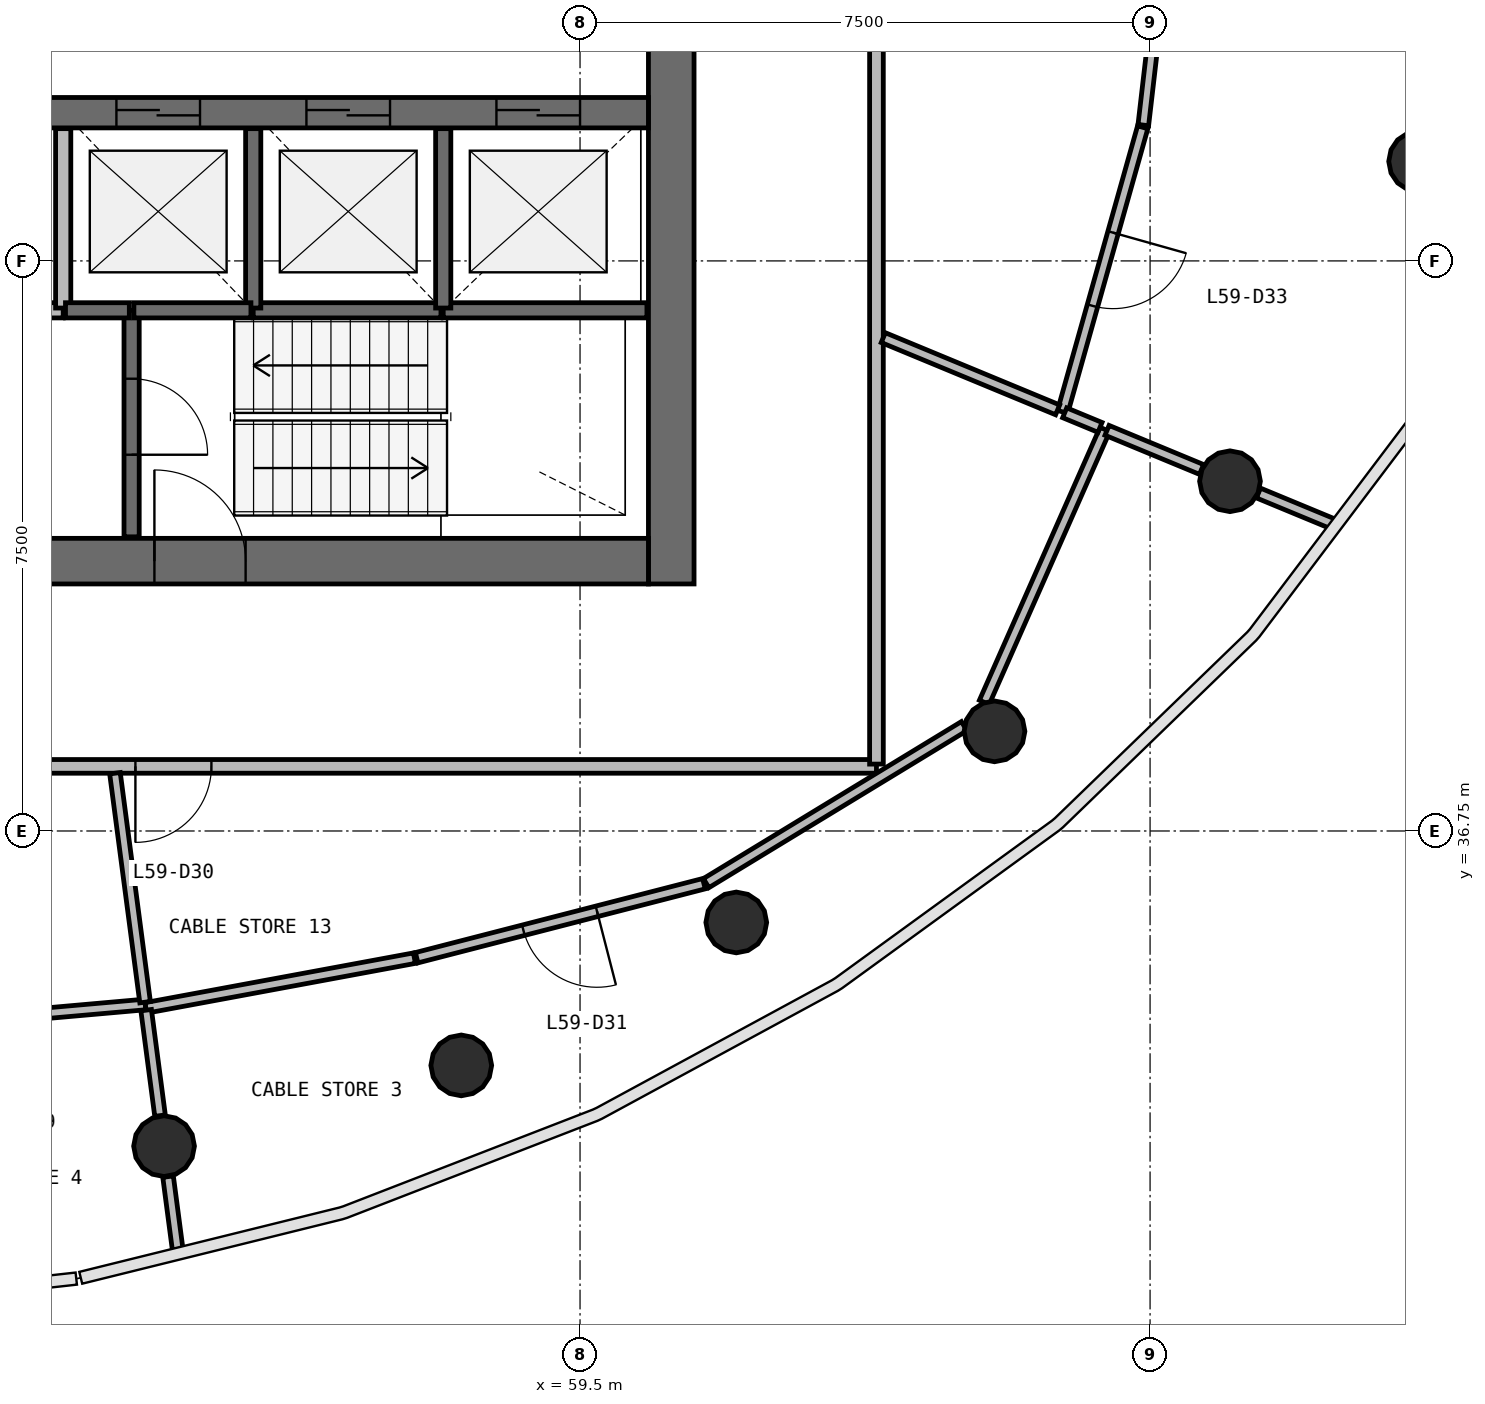
"""IFC4 building model, lengths in metres.
Left out: names, types, materials, properties, quantities, classifications, styles, units other than length and angle.
Written with IfcOpenShell. Run it as: python <this file> out.ifc"""

import sys

from ifc_helpers import new_model, si_unit, direction, frame, frame_2d, origin, origin_2d, place, context, subcontext, project, spatial, rectangle, circle, extrude, source, transform, mapped, element, fill, save


model = new_model("IFC4")
c1 = context("Model", 3, precision=1e-05, world=origin(), true_north=direction((0.0, 1.0)))
c2 = subcontext(c1, "Body", "Model", "MODEL_VIEW")
j1 = project(units=[si_unit("LENGTHUNIT", "METRE"), si_unit("PLANEANGLEUNIT", "RADIAN")], contexts=[c1])
p1 = place(None, origin())
s1 = spatial("IfcSite", under=j1, at=p1, CompositionType="ELEMENT")
p2 = place(p1, origin())
s2 = spatial("IfcBuilding", under=s1, at=p2, CompositionType="ELEMENT")
p3 = place(p2, frame((0.0, 0.0, 242.3)))
s3 = spatial("IfcBuildingStorey", under=s2, at=p3, CompositionType="ELEMENT", Elevation=242.3)
p4 = place(p3, frame((60.7, 40.0, 0.0), z_axis=(0.0, 0.0, 1.0), x_axis=(0.0, 1.0, 0.0)))
e1 = element("IfcWall", 1, at=p4, inside=s3, PredefinedType="SHEAR", context=c2, shape_type="SweptSolid", body=[
    extrude(rectangle(XDim=16.0, YDim=0.6, at=frame_2d((8.0, 0.0))), origin(), (0.0, 0.0, 1.0), 3.9),
])
p5 = place(p4, frame((7.1, 0.0, 0.0)))
e2 = element("IfcOpeningElement", 2, at=p5, cuts=e1, PredefinedType="OPENING", context=c2, shape_type="SweptSolid", body=[
    extrude(rectangle(XDim=1.8, YDim=2.1, at=frame_2d((0.9, 1.05))), frame((0.0, 0.31, 0.0), z_axis=(0.0, -1.0, 0.0), x_axis=(1.0, 0.0, 0.0)), (0.0, 0.0, 1.0), 0.62),
])
p6 = place(p3, frame((43.6, 40.3, 0.0), z_axis=(0.0, 0.0, 1.0), x_axis=(1.0, 0.0, 0.0)))
e3 = element("IfcWall", 3, at=p6, inside=s3, PredefinedType="SHEAR", context=c2, shape_type="SweptSolid", body=[
    extrude(rectangle(XDim=16.8, YDim=0.6, at=frame_2d((8.4, 0.0))), origin(), (0.0, 0.0, 1.0), 3.9),
])
p7 = place(p6, frame((10.3, 0.0, 0.0)))
e4 = element("IfcOpeningElement", 4, at=p7, cuts=e3, PredefinedType="OPENING", context=c2, shape_type="SweptSolid", body=[
    extrude(rectangle(XDim=1.2, YDim=2.1, at=frame_2d((0.6, 1.05))), frame((0.0, 0.31, 0.0), z_axis=(0.0, -1.0, 0.0), x_axis=(1.0, 0.0, 0.0)), (0.0, 0.0, 1.0), 0.62),
])
p8 = place(p6, frame((7.25, 0.0, 0.0)))
e5 = element("IfcOpeningElement", 5, at=p8, cuts=e3, PredefinedType="OPENING", context=c2, shape_type="SweptSolid", body=[
    extrude(rectangle(XDim=1.1, YDim=2.1, at=frame_2d((0.55, 1.05))), frame((0.0, 0.31, 0.0), z_axis=(0.0, -1.0, 0.0), x_axis=(1.0, 0.0, 0.0)), (0.0, 0.0, 1.0), 0.62),
])
p9 = place(p6, frame((0.7, 0.0, 0.0)))
e6 = element("IfcOpeningElement", 6, at=p9, cuts=e3, PredefinedType="OPENING", context=c2, shape_type="SweptSolid", body=[
    extrude(rectangle(XDim=0.8, YDim=2.1, at=frame_2d((0.4, 1.05))), frame((0.0, 0.31, 0.0), z_axis=(0.0, -1.0, 0.0), x_axis=(1.0, 0.0, 0.0)), (0.0, 0.0, 1.0), 0.62),
])
p10 = place(p3, frame((43.6, 46.2, 0.0), z_axis=(0.0, 0.0, 1.0), x_axis=(1.0, 0.0, 0.0)))
e7 = element("IfcWall", 7, at=p10, inside=s3, PredefinedType="SHEAR", context=c2, shape_type="SweptSolid", body=[
    extrude(rectangle(XDim=16.8, YDim=0.4, at=frame_2d((8.4, 0.0))), origin(), (0.0, 0.0, 1.0), 3.9),
])
p11 = place(p10, frame((9.8, 0.0, 0.0)))
e8 = element("IfcOpeningElement", 8, at=p11, cuts=e7, PredefinedType="OPENING", context=c2, shape_type="SweptSolid", body=[
    extrude(rectangle(XDim=1.1, YDim=2.1, at=frame_2d((0.55, 1.05))), frame((0.0, 0.21, 0.0), z_axis=(0.0, -1.0, 0.0), x_axis=(1.0, 0.0, 0.0)), (0.0, 0.0, 1.0), 0.42),
])
p12 = place(p10, frame((12.3, 0.0, 0.0)))
e9 = element("IfcOpeningElement", 9, at=p12, cuts=e7, PredefinedType="OPENING", context=c2, shape_type="SweptSolid", body=[
    extrude(rectangle(XDim=1.1, YDim=2.1, at=frame_2d((0.55, 1.05))), frame((0.0, 0.21, 0.0), z_axis=(0.0, -1.0, 0.0), x_axis=(1.0, 0.0, 0.0)), (0.0, 0.0, 1.0), 0.42),
])
p13 = place(p10, frame((14.8, 0.0, 0.0)))
e10 = element("IfcOpeningElement", 10, at=p13, cuts=e7, PredefinedType="OPENING", context=c2, shape_type="SweptSolid", body=[
    extrude(rectangle(XDim=1.1, YDim=2.1, at=frame_2d((0.55, 1.05))), frame((0.0, 0.21, 0.0), z_axis=(0.0, -1.0, 0.0), x_axis=(1.0, 0.0, 0.0)), (0.0, 0.0, 1.0), 0.42),
])
p14 = place(p10, frame((3.45, 0.0, 0.0)))
e11 = element("IfcOpeningElement", 11, at=p14, cuts=e7, PredefinedType="OPENING", context=c2, shape_type="SweptSolid", body=[
    extrude(rectangle(XDim=0.9, YDim=2.1, at=frame_2d((0.45, 1.05))), frame((0.0, 0.21, 0.0), z_axis=(0.0, -1.0, 0.0), x_axis=(1.0, 0.0, 0.0)), (0.0, 0.0, 1.0), 0.42),
])
p15 = place(p10, frame((7.85, 0.0, 0.0)))
e12 = element("IfcOpeningElement", 12, at=p15, cuts=e7, PredefinedType="OPENING", context=c2, shape_type="SweptSolid", body=[
    extrude(rectangle(XDim=0.9, YDim=2.1, at=frame_2d((0.45, 1.05))), frame((0.0, 0.21, 0.0), z_axis=(0.0, -1.0, 0.0), x_axis=(1.0, 0.0, 0.0)), (0.0, 0.0, 1.0), 0.42),
])
m1 = source(origin(), c2, "Body", "SweptSolid", [
    extrude(circle(Radius=0.4, at=origin_2d()), origin(), (0.0, 0.0, 1.0), 3.9),
])
for number, where, z_axis, x_axis in (
    (13, (54.027, 32.604, 0.0), (0.0, 0.0, 1.0), (1.0, 0.0, 0.0)),
    (14, (57.937, 33.666, 0.0), (0.0, 0.0, 1.0), (1.0, 0.0, 0.0)),
    (15, (61.556, 35.547, 0.0), (0.0, 0.0, 1.0), (1.0, 0.0, 0.0)),
    (16, (64.953, 38.061, 0.0), (0.0, 0.0, 1.0), (1.0, 0.0, 0.0)),
    (17, (68.052, 41.351, 0.0), (0.0, 0.0, 1.0), (1.0, 0.0, 0.0)),
    (18, (70.54, 45.559, 0.0), (0.0, 0.0, 1.0), (1.0, 0.0, 0.0)),
):
    element("IfcColumn", number, at=place(p3, frame(where, z_axis=z_axis, x_axis=x_axis)), inside=s3, PredefinedType="COLUMN", context=c2, shape_type="MappedRepresentation", body=[
        mapped(m1, transform((0.0, 0.0, 0.0), scale=1.0)),
    ])
p16 = place(p3, frame((52.7, 43.6, 0.0), z_axis=(0.0, 0.0, 1.0), x_axis=(-1.0, 0.0, 0.0)))
e19 = element("IfcWall", 19, at=p16, inside=s3, PredefinedType="SOLIDWALL", context=c2, shape_type="SweptSolid", body=[
    extrude(rectangle(XDim=4.8, YDim=0.2, at=frame_2d((2.4, 0.0))), origin(), (0.0, 0.0, 1.0), 3.58),
])
p17 = place(p3, frame((53.6, 43.6, 0.0), z_axis=(0.0, 0.0, 1.0), x_axis=(0.0, -1.0, 0.0)))
e20 = element("IfcWall", 20, at=p17, inside=s3, PredefinedType="SOLIDWALL", context=c2, shape_type="SweptSolid", body=[
    extrude(rectangle(XDim=2.98, YDim=0.2, at=frame_2d((1.49, 0.0))), origin(), (0.0, 0.0, 1.0), 3.58),
])
p18 = place(p17, frame((0.9, 0.0, 0.0)))
e21 = element("IfcOpeningElement", 21, at=p18, cuts=e20, PredefinedType="OPENING", context=c2, shape_type="SweptSolid", body=[
    extrude(rectangle(XDim=1.0, YDim=2.1, at=frame_2d((0.5, 1.05))), frame((0.0, 0.11, 0.0), z_axis=(0.0, -1.0, 0.0), x_axis=(1.0, 0.0, 0.0)), (0.0, 0.0, 1.0), 0.22),
])
p19 = place(p3, frame((57.7, 43.6, 0.0), z_axis=(0.0, 0.0, 1.0), x_axis=(1.0, 0.0, 0.0)))
e22 = element("IfcWall", 22, at=p19, inside=s3, PredefinedType="SOLIDWALL", context=c2, shape_type="SweptSolid", body=[
    extrude(rectangle(XDim=2.68, YDim=0.2, at=frame_2d((1.34, 0.0))), origin(), (0.0, 0.0, 1.0), 3.58),
])
p20 = place(p3, frame((55.2, 43.6, 0.0), z_axis=(0.0, 0.0, 1.0), x_axis=(1.0, 0.0, 0.0)))
e23 = element("IfcWall", 23, at=p20, inside=s3, PredefinedType="SOLIDWALL", context=c2, shape_type="SweptSolid", body=[
    extrude(rectangle(XDim=2.47, YDim=0.2, at=frame_2d((1.235, 0.0))), origin(), (0.0, 0.0, 1.0), 3.58),
])
for number, where, z_axis, x_axis in (
    (24, (52.7, 45.99, 0.0), (0.0, 0.0, 1.0), (0.0, -1.0, 0.0)),
    (25, (55.2, 43.63, 0.0), (0.0, 0.0, 1.0), (0.0, 1.0, 0.0)),
    (26, (57.7, 43.63, 0.0), (0.0, 0.0, 1.0), (0.0, 1.0, 0.0)),
):
    element("IfcWall", number, at=place(p3, frame(where, z_axis=z_axis, x_axis=x_axis)), inside=s3, PredefinedType="SOLIDWALL", context=c2, shape_type="SweptSolid", body=[
        extrude(rectangle(XDim=2.36, YDim=0.2, at=frame_2d((1.18, 0.0))), origin(), (0.0, 0.0, 1.0), 3.58),
    ])
p21 = place(p3, frame((53.63, 43.6, 0.0), z_axis=(0.0, 0.0, 1.0), x_axis=(1.0, 0.0, 0.0)))
e27 = element("IfcWall", 27, at=p21, inside=s3, PredefinedType="SOLIDWALL", context=c2, shape_type="SweptSolid", body=[
    extrude(rectangle(XDim=1.54, YDim=0.2, at=frame_2d((0.77, 0.0))), origin(), (0.0, 0.0, 1.0), 3.58),
])
p22 = place(p3, frame((52.73, 43.6, 0.0), z_axis=(0.0, 0.0, 1.0), x_axis=(1.0, 0.0, 0.0)))
e28 = element("IfcWall", 28, at=p22, inside=s3, PredefinedType="SOLIDWALL", context=c2, shape_type="SweptSolid", body=[
    extrude(rectangle(XDim=0.84, YDim=0.2, at=frame_2d((0.42, 0.0))), origin(), (0.0, 0.0, 1.0), 3.58),
])
p23 = place(p3, frame((63.4, 37.6, 0.0), z_axis=(0.0, 0.0, 1.0), x_axis=(-1.0, 0.0, 0.0)))
e29 = element("IfcWall", 29, at=p23, inside=s3, PredefinedType="PARTITIONING", context=c2, shape_type="SweptSolid", body=[
    extrude(rectangle(XDim=22.8, YDim=0.18, at=frame_2d((11.4, 0.0))), origin(), (0.0, 0.0, 1.0), 2.88),
])
p24 = place(p23, frame((10.95, 0.0, 0.0)))
e30 = element("IfcOpeningElement", 30, at=p24, cuts=e29, PredefinedType="OPENING", context=c2, shape_type="SweptSolid", body=[
    extrude(rectangle(XDim=1.0, YDim=2.1, at=frame_2d((0.5, 1.05))), frame((0.0, 0.1, 0.0), z_axis=(0.0, -1.0, 0.0), x_axis=(1.0, 0.0, 0.0)), (0.0, 0.0, 1.0), 0.2),
])
p25 = place(p23, frame((8.75, 0.0, 0.0)))
e31 = element("IfcOpeningElement", 31, at=p25, cuts=e29, PredefinedType="OPENING", context=c2, shape_type="SweptSolid", body=[
    extrude(rectangle(XDim=1.0, YDim=2.1, at=frame_2d((0.5, 1.05))), frame((0.0, 0.1, 0.0), z_axis=(0.0, -1.0, 0.0), x_axis=(1.0, 0.0, 0.0)), (0.0, 0.0, 1.0), 0.2),
])
p26 = place(p3, frame((63.4, 58.37, 0.0), z_axis=(0.0, 0.0, 1.0), x_axis=(0.0, -1.0, 0.0)))
e32 = element("IfcWall", 32, at=p26, inside=s3, PredefinedType="PARTITIONING", context=c2, shape_type="SweptSolid", body=[
    extrude(rectangle(XDim=20.74, YDim=0.18, at=frame_2d((10.37, 0.0))), origin(), (0.0, 0.0, 1.0), 2.88),
])
p27 = place(p26, frame((9.89, 0.0, 0.0)))
e33 = element("IfcOpeningElement", 33, at=p27, cuts=e32, PredefinedType="OPENING", context=c2, shape_type="SweptSolid", body=[
    extrude(rectangle(XDim=1.0, YDim=2.1, at=frame_2d((0.5, 1.05))), frame((0.0, 0.1, 0.0), z_axis=(0.0, -1.0, 0.0), x_axis=(1.0, 0.0, 0.0)), (0.0, 0.0, 1.0), 0.2),
])
p28 = place(p26, frame((7.69, 0.0, 0.0)))
e34 = element("IfcOpeningElement", 34, at=p28, cuts=e32, PredefinedType="OPENING", context=c2, shape_type="SweptSolid", body=[
    extrude(rectangle(XDim=1.0, YDim=2.1, at=frame_2d((0.5, 1.05))), frame((0.0, 0.1, 0.0), z_axis=(0.0, -1.0, 0.0), x_axis=(1.0, 0.0, 0.0)), (0.0, 0.0, 1.0), 0.2),
])
p29 = place(p3, frame((66.911, 46.037, 0.0), z_axis=(0.0, 0.0, 1.0), x_axis=(0.115273055571, 0.993333842502, 0.0)))
e35 = element("IfcWall", 35, at=p29, inside=s3, PredefinedType="PARTITIONING", context=c2, shape_type="SweptSolid", body=[
    extrude(rectangle(XDim=3.984, YDim=0.14, at=frame_2d((1.992, 0.0))), origin(), (0.0, 0.0, 1.0), 2.88),
])
p30 = place(p3, frame((61.159, 36.064, 0.0), z_axis=(0.0, 0.0, 1.0), x_axis=(0.854311228383, 0.519761796459, 0.0)))
e36 = element("IfcWall", 36, at=p30, inside=s3, PredefinedType="PARTITIONING", context=c2, shape_type="SweptSolid", body=[
    extrude(rectangle(XDim=3.974, YDim=0.14, at=frame_2d((1.987, 0.0))), origin(), (0.0, 0.0, 1.0), 2.88),
])
p31 = place(p3, frame((61.13, 36.056, 0.0), z_axis=(0.0, 0.0, 1.0), x_axis=(-0.968365634835, -0.249535563137, 0.0)))
e37 = element("IfcWall", 37, at=p31, inside=s3, PredefinedType="PARTITIONING", context=c2, shape_type="SweptSolid", body=[
    extrude(rectangle(XDim=3.903, YDim=0.14, at=frame_2d((1.951, 0.0))), origin(), (0.0, 0.0, 1.0), 2.88),
])
p32 = place(p31, frame((1.453, 0.0, 0.0)))
e38 = element("IfcOpeningElement", 38, at=p32, cuts=e37, PredefinedType="OPENING", context=c2, shape_type="SweptSolid", body=[
    extrude(rectangle(XDim=1.0, YDim=2.1, at=frame_2d((0.5, 1.05))), frame((0.0, 0.08, 0.0), z_axis=(0.0, -1.0, 0.0), x_axis=(1.0, 0.0, 0.0)), (0.0, 0.0, 1.0), 0.16),
])
p33 = place(p3, frame((64.819, 38.442, 0.0), z_axis=(0.0, 0.0, 1.0), x_axis=(0.404296947446, 0.914627781278, 0.0)))
e39 = element("IfcWall", 39, at=p33, inside=s3, PredefinedType="PARTITIONING", context=c2, shape_type="SweptSolid", body=[
    extrude(rectangle(XDim=3.926, YDim=0.14, at=frame_2d((1.963, 0.0))), origin(), (0.0, 0.0, 1.0), 2.88),
])
p34 = place(p3, frame((66.903, 46.008, 0.0), z_axis=(0.0, 0.0, 1.0), x_axis=(-0.270889164169, -0.962610544684, 0.0)))
e40 = element("IfcWall", 40, at=p34, inside=s3, PredefinedType="PARTITIONING", context=c2, shape_type="SweptSolid", body=[
    extrude(rectangle(XDim=3.89, YDim=0.14, at=frame_2d((1.945, 0.0))), origin(), (0.0, 0.0, 1.0), 2.88),
])
p35 = place(p34, frame((1.44, 0.0, 0.0)))
e41 = element("IfcOpeningElement", 41, at=p35, cuts=e40, PredefinedType="OPENING", context=c2, shape_type="SweptSolid", body=[
    extrude(rectangle(XDim=1.0, YDim=2.1, at=frame_2d((0.5, 1.05))), frame((0.0, 0.08, 0.0), z_axis=(0.0, -1.0, 0.0), x_axis=(1.0, 0.0, 0.0)), (0.0, 0.0, 1.0), 0.16),
])
p36 = place(p3, frame((53.788, 34.423, 0.0), z_axis=(0.0, 0.0, 1.0), x_axis=(0.983272092094, 0.182142781656, 0.0)))
e42 = element("IfcWall", 42, at=p36, inside=s3, PredefinedType="PARTITIONING", context=c2, shape_type="SweptSolid", body=[
    extrude(rectangle(XDim=3.594, YDim=0.14, at=frame_2d((1.797, 0.0))), origin(), (0.0, 0.0, 1.0), 2.88),
])
p37 = place(p3, frame((53.779, 34.468, 0.0), z_axis=(0.0, 0.0, 1.0), x_axis=(-0.99609594944, -0.088277174337, 0.0)))
e43 = element("IfcWall", 43, at=p37, inside=s3, PredefinedType="PARTITIONING", context=c2, shape_type="SweptSolid", body=[
    extrude(rectangle(XDim=3.587, YDim=0.14, at=frame_2d((1.793, 0.0))), origin(), (0.0, 0.0, 1.0), 2.88),
])
p38 = place(p37, frame((1.337, 0.0, 0.0)))
e44 = element("IfcOpeningElement", 44, at=p38, cuts=e43, PredefinedType="OPENING", context=c2, shape_type="SweptSolid", body=[
    extrude(rectangle(XDim=1.0, YDim=2.1, at=frame_2d((0.5, 1.05))), frame((0.0, 0.08, 0.0), z_axis=(0.0, -1.0, 0.0), x_axis=(1.0, 0.0, 0.0)), (0.0, 0.0, 1.0), 0.16),
])
p39 = place(p3, frame((53.381, 37.51, 0.0), z_axis=(0.0, 0.0, 1.0), x_axis=(0.130489847189, -0.99144964561, 0.0)))
e45 = element("IfcWall", 45, at=p39, inside=s3, PredefinedType="PARTITIONING", context=c2, shape_type="SweptSolid", body=[
    extrude(rectangle(XDim=3.038, YDim=0.14, at=frame_2d((1.519, 0.0))), origin(), (0.0, 0.0, 1.0), 2.88),
])
p40 = place(p3, frame((63.49, 43.241, 0.0), z_axis=(0.0, 0.0, 1.0), x_axis=(0.923877816288, -0.38268757567, 0.0)))
e46 = element("IfcWall", 46, at=p40, inside=s3, PredefinedType="PARTITIONING", context=c2, shape_type="SweptSolid", body=[
    extrude(rectangle(XDim=2.483, YDim=0.14, at=frame_2d((1.241, 0.0))), origin(), (0.0, 0.0, 1.0), 2.88),
])
p41 = place(p3, frame((53.792, 34.393, 0.0), z_axis=(0.0, 0.0, 1.0), x_axis=(0.130450001243, -0.991454889128, 0.0)))
e47 = element("IfcWall", 47, at=p41, inside=s3, PredefinedType="PARTITIONING", context=c2, shape_type="SweptSolid", body=[
    extrude(rectangle(XDim=1.4, YDim=0.14, at=frame_2d((0.7, 0.0))), origin(), (0.0, 0.0, 1.0), 2.88),
])
p42 = place(p3, frame((66.434, 42.021, 0.0), z_axis=(0.0, 0.0, 1.0), x_axis=(0.923815650645, -0.382837620438, 0.0)))
e48 = element("IfcWall", 48, at=p42, inside=s3, PredefinedType="PARTITIONING", context=c2, shape_type="SweptSolid", body=[
    extrude(rectangle(XDim=1.346, YDim=0.14, at=frame_2d((0.673, 0.0))), origin(), (0.0, 0.0, 1.0), 2.88),
])
p43 = place(p3, frame((68.426, 41.196, 0.0), z_axis=(0.0, 0.0, 1.0), x_axis=(0.923799341262, -0.382876973823, 0.0)))
e49 = element("IfcWall", 49, at=p43, inside=s3, PredefinedType="PARTITIONING", context=c2, shape_type="SweptSolid", body=[
    extrude(rectangle(XDim=1.067, YDim=0.14, at=frame_2d((0.534, 0.0))), origin(), (0.0, 0.0, 1.0), 2.88),
])
p44 = place(p3, frame((54.08, 32.203, 0.0), z_axis=(0.0, 0.0, 1.0), x_axis=(0.130657168986, -0.991427609154, 0.0)))
e50 = element("IfcWall", 50, at=p44, inside=s3, PredefinedType="PARTITIONING", context=c2, shape_type="SweptSolid", body=[
    extrude(rectangle(XDim=0.966, YDim=0.14, at=frame_2d((0.483, 0.0))), origin(), (0.0, 0.0, 1.0), 2.88),
])
p45 = place(p3, frame((65.877, 42.252, 0.0), z_axis=(0.0, 0.0, 1.0), x_axis=(0.92392216698, -0.382580487431, 0.0)))
e51 = element("IfcWall", 51, at=p45, inside=s3, PredefinedType="PARTITIONING", context=c2, shape_type="SweptSolid", body=[
    extrude(rectangle(XDim=0.503, YDim=0.14, at=frame_2d((0.251, 0.0))), origin(), (0.0, 0.0, 1.0), 2.88),
])
m2 = source(origin(), c2, "Body", "SweptSolid", [
    extrude(rectangle(XDim=1.1, YDim=2.1, at=frame_2d((0.55, 1.05))), frame((0.0, 0.025, 0.0), z_axis=(0.0, -1.0, 0.0), x_axis=(1.0, 0.0, 0.0)), (0.0, 0.0, 1.0), 0.05),
])
p46 = place(p11, origin())
e52 = element("IfcDoor", 52, at=p46, inside=s3, OperationType="DOUBLE_DOOR_SLIDING", PredefinedType="USERDEFINED", context=c2, shape_type="MappedRepresentation", body=[
    mapped(m2, transform((0.0, 0.0, 0.0), scale=1.0)),
])
fill(e8, e52)
p47 = place(p12, origin())
e53 = element("IfcDoor", 53, at=p47, inside=s3, OperationType="DOUBLE_DOOR_SLIDING", PredefinedType="USERDEFINED", context=c2, shape_type="MappedRepresentation", body=[
    mapped(m2, transform((0.0, 0.0, 0.0), scale=1.0)),
])
fill(e9, e53)
p48 = place(p13, origin())
e54 = element("IfcDoor", 54, at=p48, inside=s3, OperationType="DOUBLE_DOOR_SLIDING", PredefinedType="USERDEFINED", context=c2, shape_type="MappedRepresentation", body=[
    mapped(m2, transform((0.0, 0.0, 0.0), scale=1.0)),
])
fill(e10, e54)
m3 = source(origin(), c2, "Body", "SweptSolid", [
    extrude(rectangle(XDim=1.2, YDim=2.1, at=frame_2d((0.6, 1.05))), frame((0.0, 0.025, 0.0), z_axis=(0.0, -1.0, 0.0), x_axis=(1.0, 0.0, 0.0)), (0.0, 0.0, 1.0), 0.05),
])
p49 = place(p7, origin())
e55 = element("IfcDoor", 55, at=p49, inside=s3, OperationType="SINGLE_SWING_LEFT", PredefinedType="DOOR", context=c2, shape_type="MappedRepresentation", body=[
    mapped(m3, transform((0.0, 0.0, 0.0), scale=1.0)),
])
fill(e4, e55)
m4 = source(origin(), c2, "Body", "SweptSolid", [
    extrude(rectangle(XDim=1.0, YDim=2.1, at=frame_2d((0.5, 1.05))), frame((0.0, 0.025, 0.0), z_axis=(0.0, -1.0, 0.0), x_axis=(1.0, 0.0, 0.0)), (0.0, 0.0, 1.0), 0.05),
])
p50 = place(p18, origin())
e56 = element("IfcDoor", 56, at=p50, inside=s3, OperationType="SINGLE_SWING_RIGHT", PredefinedType="DOOR", context=c2, shape_type="MappedRepresentation", body=[
    mapped(m4, transform((0.0, 0.0, 0.0), scale=1.0)),
])
fill(e21, e56)
m5 = source(origin(), c2, "Body", "SweptSolid", [
    extrude(rectangle(XDim=1.0, YDim=2.1, at=frame_2d((0.5, 1.05))), frame((0.0, 0.025, 0.0), z_axis=(0.0, -1.0, 0.0), x_axis=(1.0, 0.0, 0.0)), (0.0, 0.0, 1.0), 0.05),
])
p51 = place(p25, origin())
e57 = element("IfcDoor", 57, at=p51, inside=s3, OperationType="SINGLE_SWING_RIGHT", PredefinedType="DOOR", context=c2, shape_type="MappedRepresentation", body=[
    mapped(m5, transform((0.0, 0.0, 0.0), scale=1.0)),
])
fill(e31, e57)
p52 = place(p32, origin())
e58 = element("IfcDoor", 58, at=p52, inside=s3, OperationType="SINGLE_SWING_LEFT", PredefinedType="DOOR", context=c2, shape_type="MappedRepresentation", body=[
    mapped(m5, transform((0.0, 0.0, 0.0), scale=1.0)),
])
fill(e38, e58)
p53 = place(p35, origin())
e59 = element("IfcDoor", 59, at=p53, inside=s3, OperationType="SINGLE_SWING_LEFT", PredefinedType="DOOR", context=c2, shape_type="MappedRepresentation", body=[
    mapped(m5, transform((0.0, 0.0, 0.0), scale=1.0)),
])
fill(e41, e59)
save(model, sys.argv[1])
